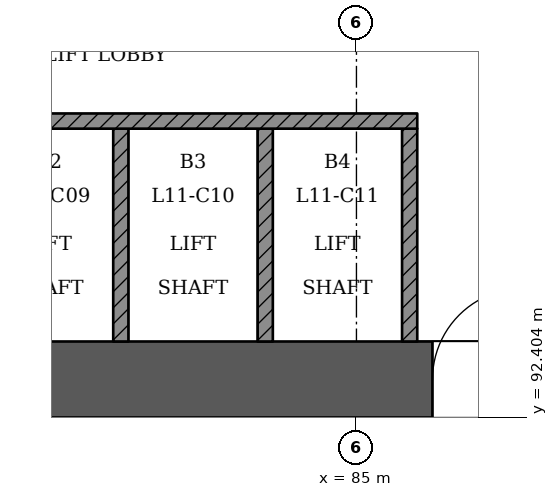
"""IFC4 building model, lengths in metres.
Left out: names, types, materials, properties, quantities, classifications, styles, units other than length and angle.
Written with IfcOpenShell. Run it as: python <this file> out.ifc"""

import sys

from ifc_helpers import new_model, si_unit, direction, frame, frame_2d, origin, place, context, subcontext, project, spatial, rectangle, extrude, element, fill, save


model = new_model("IFC4")
c1 = context("Model", 3, precision=1e-05, world=origin(), true_north=direction((0.0, 1.0)))
c2 = subcontext(c1, "Body", "Model", "MODEL_VIEW")
j1 = project(units=[si_unit("LENGTHUNIT", "METRE"), si_unit("PLANEANGLEUNIT", "RADIAN")], contexts=[c1])
p1 = place(None, origin())
s1 = spatial("IfcSite", under=j1, at=p1, CompositionType="ELEMENT")
p2 = place(p1, origin())
s2 = spatial("IfcBuilding", under=s1, at=p2, CompositionType="ELEMENT")
p3 = place(p2, frame((0.0, 0.0, 48.6)))
s3 = spatial("IfcBuildingStorey", under=s2, at=p3, CompositionType="ELEMENT", Elevation=48.6)
p4 = place(p3, frame((72.5, 92.9, 0.0), z_axis=(0.0, 0.0, 1.0), x_axis=(1.0, 0.0, 0.0)))
e1 = element("IfcWall", 1, at=p4, inside=s3, PredefinedType="SHEAR", context=c2, shape_type="SweptSolid", body=[
    extrude(rectangle(XDim=25.5, YDim=1.0, at=frame_2d((12.75, 0.0))), origin(), (0.0, 0.0, 1.0), 3.6),
])
p5 = place(p4, frame((1.3, 0.0, 0.0)))
e2 = element("IfcOpeningElement", 2, at=p5, cuts=e1, PredefinedType="OPENING", context=c2, shape_type="SweptSolid", body=[
    extrude(rectangle(XDim=1.2, YDim=2.1, at=frame_2d((0.6, 1.05))), frame((0.0, 0.51, 0.0), z_axis=(0.0, -1.0, 0.0), x_axis=(1.0, 0.0, 0.0)), (0.0, 0.0, 1.0), 1.021),
])
p6 = place(p4, frame((3.5, 0.0, 0.0)))
e3 = element("IfcOpeningElement", 3, at=p6, cuts=e1, PredefinedType="OPENING", context=c2, shape_type="SweptSolid", body=[
    extrude(rectangle(XDim=1.2, YDim=2.1, at=frame_2d((0.6, 1.05))), frame((0.0, 0.51, 0.0), z_axis=(0.0, -1.0, 0.0), x_axis=(1.0, 0.0, 0.0)), (0.0, 0.0, 1.0), 1.021),
])
p7 = place(p4, frame((13.5, 0.0, 0.0)))
e4 = element("IfcOpeningElement", 4, at=p7, cuts=e1, PredefinedType="OPENING", context=c2, shape_type="SweptSolid", body=[
    extrude(rectangle(XDim=1.2, YDim=2.1, at=frame_2d((0.6, 1.05))), frame((0.0, 0.51, 0.0), z_axis=(0.0, -1.0, 0.0), x_axis=(1.0, 0.0, 0.0)), (0.0, 0.0, 1.0), 1.021),
])
p8 = place(p4, frame((16.913, 0.0, 0.0)))
e5 = element("IfcOpeningElement", 5, at=p8, cuts=e1, PredefinedType="OPENING", context=c2, shape_type="SweptSolid", body=[
    extrude(rectangle(XDim=1.0, YDim=2.1, at=frame_2d((0.5, 1.05))), frame((0.0, 0.51, 0.0), z_axis=(0.0, -1.0, 0.0), x_axis=(1.0, 0.0, 0.0)), (0.0, 0.0, 1.0), 1.021),
])
p9 = place(p4, frame((20.8, 0.0, 0.0)))
e6 = element("IfcOpeningElement", 6, at=p9, cuts=e1, PredefinedType="OPENING", context=c2, shape_type="SweptSolid", body=[
    extrude(rectangle(XDim=1.0, YDim=2.1, at=frame_2d((0.5, 1.05))), frame((0.0, 0.51, 0.0), z_axis=(0.0, -1.0, 0.0), x_axis=(1.0, 0.0, 0.0)), (0.0, 0.0, 1.0), 1.021),
])
p10 = place(p4, frame((23.238, 0.0, 0.0)))
e7 = element("IfcOpeningElement", 7, at=p10, cuts=e1, PredefinedType="OPENING", context=c2, shape_type="SweptSolid", body=[
    extrude(rectangle(XDim=1.0, YDim=2.1, at=frame_2d((0.5, 1.05))), frame((0.0, 0.51, 0.0), z_axis=(0.0, -1.0, 0.0), x_axis=(1.0, 0.0, 0.0)), (0.0, 0.0, 1.0), 1.021),
])
p11 = place(p3, frame((63.923, 93.17, 0.0), z_axis=(0.0, 0.0, 1.0), x_axis=(0.500002225217, -0.866024119051, 0.0)))
e8 = element("IfcWall", 8, at=p11, inside=s3, PredefinedType="PARTITIONING", context=c2, shape_type="SweptSolid", body=[
    extrude(rectangle(XDim=38.6, YDim=0.15, at=frame_2d((19.3, 0.0))), origin(), (0.0, 0.0, 1.0), 2.7),
])
p12 = place(p11, frame((0.605, 0.0, 0.0)))
e9 = element("IfcOpeningElement", 9, at=p12, cuts=e8, PredefinedType="OPENING", context=c2, shape_type="SweptSolid", body=[
    extrude(rectangle(XDim=1.0, YDim=2.1, at=frame_2d((0.5, 1.05))), frame((0.0, 0.085, 0.0), z_axis=(0.0, -1.0, 0.0), x_axis=(1.0, 0.0, 0.0)), (0.0, 0.0, 1.0), 0.171),
])
p13 = place(p11, frame((7.28, 0.0, 0.0)))
e10 = element("IfcOpeningElement", 10, at=p13, cuts=e8, PredefinedType="OPENING", context=c2, shape_type="SweptSolid", body=[
    extrude(rectangle(XDim=1.0, YDim=2.1, at=frame_2d((0.5, 1.05))), frame((0.0, 0.085, 0.0), z_axis=(0.0, -1.0, 0.0), x_axis=(1.0, 0.0, 0.0)), (0.0, 0.0, 1.0), 0.171),
])
p14 = place(p11, frame((9.72, 0.0, 0.0)))
e11 = element("IfcOpeningElement", 11, at=p14, cuts=e8, PredefinedType="OPENING", context=c2, shape_type="SweptSolid", body=[
    extrude(rectangle(XDim=1.0, YDim=2.1, at=frame_2d((0.5, 1.05))), frame((0.0, 0.085, 0.0), z_axis=(0.0, -1.0, 0.0), x_axis=(1.0, 0.0, 0.0)), (0.0, 0.0, 1.0), 0.171),
])
p15 = place(p11, frame((16.395, 0.0, 0.0)))
e12 = element("IfcOpeningElement", 12, at=p15, cuts=e8, PredefinedType="OPENING", context=c2, shape_type="SweptSolid", body=[
    extrude(rectangle(XDim=1.0, YDim=2.1, at=frame_2d((0.5, 1.05))), frame((0.0, 0.085, 0.0), z_axis=(0.0, -1.0, 0.0), x_axis=(1.0, 0.0, 0.0)), (0.0, 0.0, 1.0), 0.171),
])
p16 = place(p11, frame((18.72, 0.0, 0.0)))
e13 = element("IfcOpeningElement", 13, at=p16, cuts=e8, PredefinedType="OPENING", context=c2, shape_type="SweptSolid", body=[
    extrude(rectangle(XDim=1.0, YDim=2.1, at=frame_2d((0.5, 1.05))), frame((0.0, 0.085, 0.0), z_axis=(0.0, -1.0, 0.0), x_axis=(1.0, 0.0, 0.0)), (0.0, 0.0, 1.0), 0.171),
])
p17 = place(p11, frame((25.395, 0.0, 0.0)))
e14 = element("IfcOpeningElement", 14, at=p17, cuts=e8, PredefinedType="OPENING", context=c2, shape_type="SweptSolid", body=[
    extrude(rectangle(XDim=1.0, YDim=2.1, at=frame_2d((0.5, 1.05))), frame((0.0, 0.085, 0.0), z_axis=(0.0, -1.0, 0.0), x_axis=(1.0, 0.0, 0.0)), (0.0, 0.0, 1.0), 0.171),
])
p18 = place(p11, frame((27.605, 0.0, 0.0)))
e15 = element("IfcOpeningElement", 15, at=p18, cuts=e8, PredefinedType="OPENING", context=c2, shape_type="SweptSolid", body=[
    extrude(rectangle(XDim=1.0, YDim=2.1, at=frame_2d((0.5, 1.05))), frame((0.0, 0.085, 0.0), z_axis=(0.0, -1.0, 0.0), x_axis=(1.0, 0.0, 0.0)), (0.0, 0.0, 1.0), 0.171),
])
p19 = place(p11, frame((34.28, 0.0, 0.0)))
e16 = element("IfcOpeningElement", 16, at=p19, cuts=e8, PredefinedType="OPENING", context=c2, shape_type="SweptSolid", body=[
    extrude(rectangle(XDim=1.0, YDim=2.1, at=frame_2d((0.5, 1.05))), frame((0.0, 0.085, 0.0), z_axis=(0.0, -1.0, 0.0), x_axis=(1.0, 0.0, 0.0)), (0.0, 0.0, 1.0), 0.171),
])
p20 = place(p11, frame((37.342, 0.0, 0.0)))
e17 = element("IfcOpeningElement", 17, at=p20, cuts=e8, PredefinedType="OPENING", context=c2, shape_type="SweptSolid", body=[
    extrude(rectangle(XDim=1.0, YDim=2.1, at=frame_2d((0.5, 1.05))), frame((0.0, 0.085, 0.0), z_axis=(0.0, -1.0, 0.0), x_axis=(1.0, 0.0, 0.0)), (0.0, 0.0, 1.0), 0.171),
])
p21 = place(p3, frame((86.109, 58.583, 0.0), z_axis=(0.0, 0.0, 1.0), x_axis=(0.499999734377, 0.866025557142, 0.0)))
e18 = element("IfcWall", 18, at=p21, inside=s3, PredefinedType="PARTITIONING", context=c2, shape_type="SweptSolid", body=[
    extrude(rectangle(XDim=39.938, YDim=0.15, at=frame_2d((19.969, 0.0))), origin(), (0.0, 0.0, 1.0), 2.7),
])
p22 = place(p21, frame((3.619, 0.0, 0.0)))
e19 = element("IfcOpeningElement", 19, at=p22, cuts=e18, PredefinedType="OPENING", context=c2, shape_type="SweptSolid", body=[
    extrude(rectangle(XDim=1.2, YDim=2.1, at=frame_2d((0.6, 1.05))), frame((0.0, 0.085, 0.0), z_axis=(0.0, -1.0, 0.0), x_axis=(1.0, 0.0, 0.0)), (0.0, 0.0, 1.0), 0.171),
])
p23 = place(p21, frame((11.217, 0.0, 0.0)))
e20 = element("IfcOpeningElement", 20, at=p23, cuts=e18, PredefinedType="OPENING", context=c2, shape_type="SweptSolid", body=[
    extrude(rectangle(XDim=1.0, YDim=2.1, at=frame_2d((0.5, 1.05))), frame((0.0, 0.085, 0.0), z_axis=(0.0, -1.0, 0.0), x_axis=(1.0, 0.0, 0.0)), (0.0, 0.0, 1.0), 0.171),
])
p24 = place(p21, frame((13.658, 0.0, 0.0)))
e21 = element("IfcOpeningElement", 21, at=p24, cuts=e18, PredefinedType="OPENING", context=c2, shape_type="SweptSolid", body=[
    extrude(rectangle(XDim=1.0, YDim=2.1, at=frame_2d((0.5, 1.05))), frame((0.0, 0.085, 0.0), z_axis=(0.0, -1.0, 0.0), x_axis=(1.0, 0.0, 0.0)), (0.0, 0.0, 1.0), 0.171),
])
p25 = place(p21, frame((20.217, 0.0, 0.0)))
e22 = element("IfcOpeningElement", 22, at=p25, cuts=e18, PredefinedType="OPENING", context=c2, shape_type="SweptSolid", body=[
    extrude(rectangle(XDim=1.0, YDim=2.1, at=frame_2d((0.5, 1.05))), frame((0.0, 0.085, 0.0), z_axis=(0.0, -1.0, 0.0), x_axis=(1.0, 0.0, 0.0)), (0.0, 0.0, 1.0), 0.171),
])
p26 = place(p21, frame((22.658, 0.0, 0.0)))
e23 = element("IfcOpeningElement", 23, at=p26, cuts=e18, PredefinedType="OPENING", context=c2, shape_type="SweptSolid", body=[
    extrude(rectangle(XDim=1.0, YDim=2.1, at=frame_2d((0.5, 1.05))), frame((0.0, 0.085, 0.0), z_axis=(0.0, -1.0, 0.0), x_axis=(1.0, 0.0, 0.0)), (0.0, 0.0, 1.0), 0.171),
])
p27 = place(p21, frame((29.217, 0.0, 0.0)))
e24 = element("IfcOpeningElement", 24, at=p27, cuts=e18, PredefinedType="OPENING", context=c2, shape_type="SweptSolid", body=[
    extrude(rectangle(XDim=1.0, YDim=2.1, at=frame_2d((0.5, 1.05))), frame((0.0, 0.085, 0.0), z_axis=(0.0, -1.0, 0.0), x_axis=(1.0, 0.0, 0.0)), (0.0, 0.0, 1.0), 0.171),
])
p28 = place(p21, frame((31.658, 0.0, 0.0)))
e25 = element("IfcOpeningElement", 25, at=p28, cuts=e18, PredefinedType="OPENING", context=c2, shape_type="SweptSolid", body=[
    extrude(rectangle(XDim=1.0, YDim=2.1, at=frame_2d((0.5, 1.05))), frame((0.0, 0.085, 0.0), z_axis=(0.0, -1.0, 0.0), x_axis=(1.0, 0.0, 0.0)), (0.0, 0.0, 1.0), 0.171),
])
p29 = place(p21, frame((38.217, 0.0, 0.0)))
e26 = element("IfcOpeningElement", 26, at=p29, cuts=e18, PredefinedType="OPENING", context=c2, shape_type="SweptSolid", body=[
    extrude(rectangle(XDim=1.0, YDim=2.1, at=frame_2d((0.5, 1.05))), frame((0.0, 0.085, 0.0), z_axis=(0.0, -1.0, 0.0), x_axis=(1.0, 0.0, 0.0)), (0.0, 0.0, 1.0), 0.171),
])
for number, where, z_axis, x_axis in (
    (27, (81.9, 93.4, 0.0), (0.0, 0.0, 1.0), (0.0, 1.0, 0.0)),
    (28, (83.8, 93.4, 0.0), (0.0, 0.0, 1.0), (0.0, 1.0, 0.0)),
    (29, (85.7, 93.4, 0.0), (0.0, 0.0, 1.0), (0.0, 1.0, 0.0)),
):
    element("IfcWall", number, at=place(p3, frame(where, z_axis=z_axis, x_axis=x_axis)), inside=s3, PredefinedType="SOLIDWALL", context=c2, shape_type="SweptSolid", body=[
        extrude(rectangle(XDim=2.8, YDim=0.2, at=frame_2d((1.4, 0.0))), origin(), (0.0, 0.0, 1.0), 3.1),
    ])
p30 = place(p3, frame((78.0, 96.3, 0.0), z_axis=(0.0, 0.0, 1.0), x_axis=(1.0, 0.0, 0.0)))
e30 = element("IfcWall", 30, at=p30, inside=s3, PredefinedType="SOLIDWALL", context=c2, shape_type="SweptSolid", body=[
    extrude(rectangle(XDim=7.8, YDim=0.2, at=frame_2d((3.9, 0.0))), origin(), (0.0, 0.0, 1.0), 3.1),
])
p31 = place(p7, origin())
e31 = element("IfcDoor", 31, at=p31, inside=s3, OperationType="SINGLE_SWING_RIGHT", PredefinedType="NOTDEFINED", context=c2, shape_type="SweptSolid", body=[
    extrude(rectangle(XDim=1.2, YDim=2.1, at=frame_2d((0.6, 1.05))), frame((0.0, 0.025, 0.0), z_axis=(0.0, -1.0, 0.0), x_axis=(1.0, 0.0, 0.0)), (0.0, 0.0, 1.0), 0.05),
])
fill(e4, e31)
save(model, sys.argv[1])
